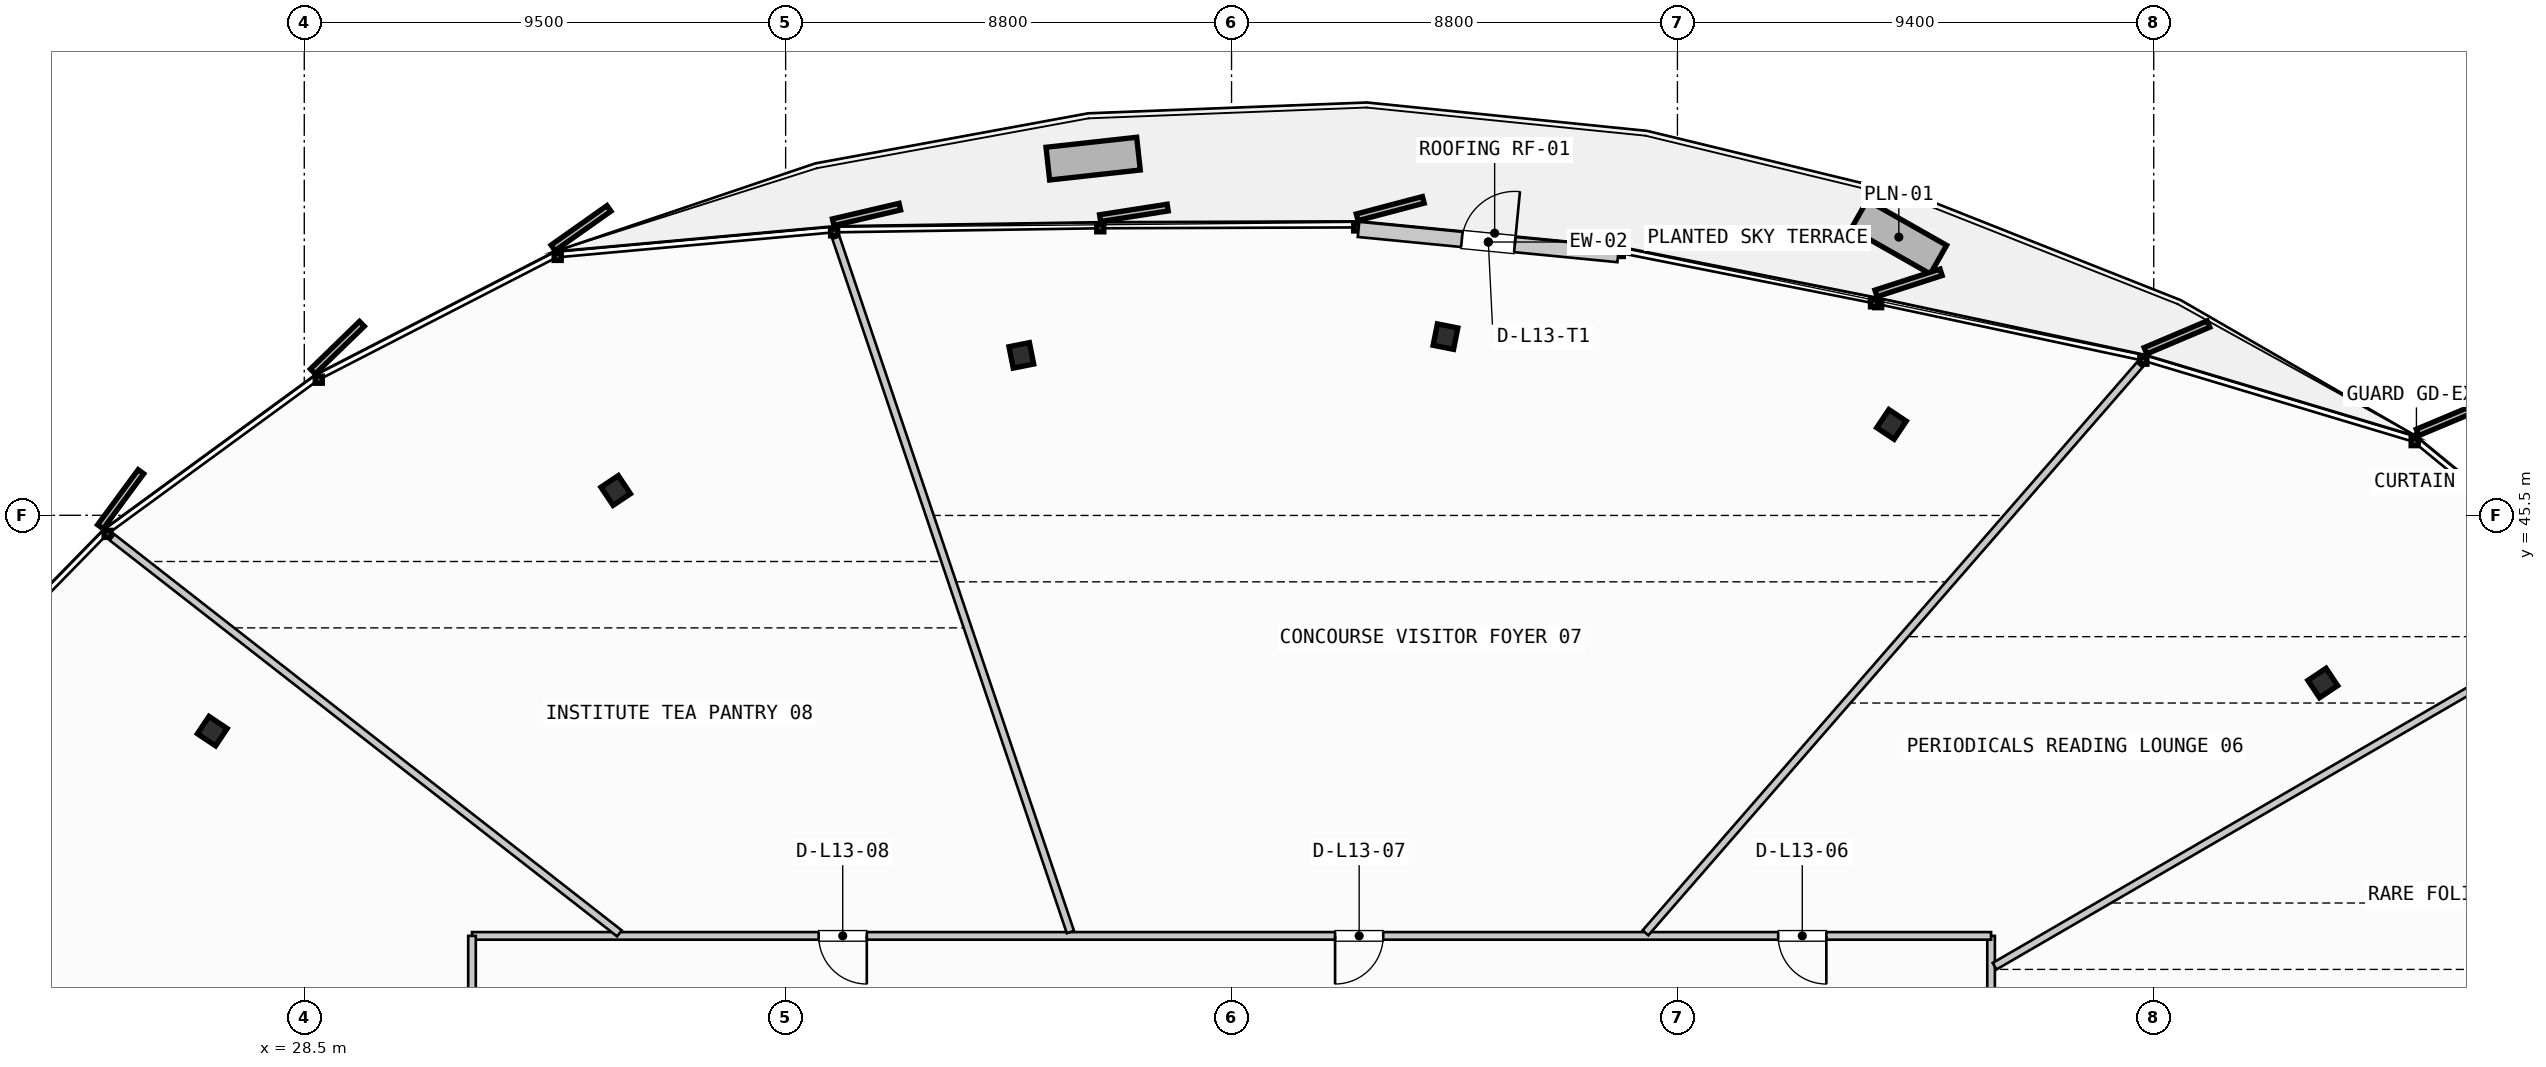
"""IFC4 building model, lengths in metres.
Left out: names, types, materials, properties, quantities, classifications, styles, units other than length and angle.
Written with IfcOpenShell. Run it as: python <this file> out.ifc"""

import sys

from ifc_helpers import new_model, si_unit, direction, frame, frame_2d, origin, origin_2d, place, context, subcontext, project, spatial, rectangle, i_section, extrude, source, transform, mapped, element, fill, save


model = new_model("IFC4")
c1 = context("Model", 3, precision=1e-05, world=origin(), true_north=direction((0.0, 1.0)))
c2 = subcontext(c1, "Body", "Model", "MODEL_VIEW")
j1 = project(units=[si_unit("LENGTHUNIT", "METRE"), si_unit("PLANEANGLEUNIT", "RADIAN")], contexts=[c1])
p1 = place(None, origin())
s1 = spatial("IfcSite", under=j1, at=p1, CompositionType="ELEMENT")
p2 = place(p1, origin())
s2 = spatial("IfcBuilding", under=s1, at=p2, CompositionType="ELEMENT")
p3 = place(p2, frame((0.0, 0.0, 56.2)))
s3 = spatial("IfcBuildingStorey", under=s2, at=p3, CompositionType="ELEMENT", Elevation=56.2)
m1 = source(origin(), c2, "Body", "SweptSolid", [
    extrude(i_section(OverallWidth=0.412, OverallDepth=0.431, WebThickness=0.042, FlangeThickness=0.068, FilletRadius=0.015, at=origin_2d()), origin(), (0.0, 0.0, 1.0), 3.55),
])
for number, where, z_axis, x_axis in (
    (1, (68.336, 42.19, 0.0), (0.0, 0.0, 1.0), (0.831, 0.556, 0.0)),
    (2, (59.825, 47.293, 0.0), (0.0, 0.0, 1.0), (0.556, 0.831, 0.0)),
    (3, (51.022, 49.026, 0.0), (0.0, 0.0, 1.0), (0.195, 0.981, 0.0)),
    (4, (42.652, 48.656, 0.0), (0.0, 0.0, 1.0), (-0.195, 0.981, 0.0)),
    (5, (34.646, 45.99, 0.0), (0.0, 0.0, 1.0), (-0.556, 0.831, 0.0)),
    (6, (26.685, 41.241, 0.0), (0.0, 0.0, 1.0), (-0.831, 0.556, 0.0)),
):
    element("IfcColumn", number, at=place(p3, frame(where, z_axis=z_axis, x_axis=x_axis)), inside=s3, PredefinedType="COLUMN", context=c2, shape_type="MappedRepresentation", body=[
        mapped(m1, transform((0.0, 0.0, 0.0), scale=1.0)),
    ])
p4 = place(p3, frame((49.306, 51.142, 0.0), z_axis=(0.0, 0.0, 1.0), x_axis=(0.995308557382, -0.096751618082, 0.0)))
e7 = element("IfcWall", 7, at=p4, inside=s3, PredefinedType="SOLIDWALL", context=c2, shape_type="SweptSolid", body=[
    extrude(rectangle(XDim=5.148, YDim=0.3, at=frame_2d((2.574, 0.0))), origin(), (0.0, 0.0, 1.0), 2.925),
])
p5 = place(p4, frame((2.049, 0.0, 0.0)))
e8 = element("IfcOpeningElement", 8, at=p5, cuts=e7, PredefinedType="OPENING", context=c2, shape_type="SweptSolid", body=[
    extrude(rectangle(XDim=1.05, YDim=2.2, at=frame_2d((0.525, 1.1))), frame((0.0, 0.16, 0.0), z_axis=(0.0, -1.0, 0.0), x_axis=(1.0, 0.0, 0.0)), (0.0, 0.0, 1.0), 0.32),
])
p6 = place(p3, frame((61.79, 17.98, 0.0), z_axis=(0.0, 0.0, 1.0), x_axis=(0.0, 1.0, 0.0)))
e9 = element("IfcWall", 9, at=p6, inside=s3, PredefinedType="PARTITIONING", context=c2, shape_type="SweptSolid", body=[
    extrude(rectangle(XDim=19.22, YDim=0.15, at=frame_2d((9.61, 0.0))), origin(), (0.0, 0.0, 1.0), 2.645),
])
p7 = place(p6, frame((2.332, 0.0, 0.0)))
e10 = element("IfcOpeningElement", 10, at=p7, cuts=e9, PredefinedType="OPENING", context=c2, shape_type="SweptSolid", body=[
    extrude(rectangle(XDim=0.95, YDim=2.15, at=frame_2d((0.475, 1.075))), frame((0.0, 0.085, 0.0), z_axis=(0.0, -1.0, 0.0), x_axis=(1.0, 0.0, 0.0)), (0.0, 0.0, 1.0), 0.17),
])
p8 = place(p6, frame((8.811, 0.0, 0.0)))
e11 = element("IfcOpeningElement", 11, at=p8, cuts=e9, PredefinedType="OPENING", context=c2, shape_type="SweptSolid", body=[
    extrude(rectangle(XDim=0.95, YDim=2.15, at=frame_2d((0.475, 1.075))), frame((0.0, 0.085, 0.0), z_axis=(0.0, -1.0, 0.0), x_axis=(1.0, 0.0, 0.0)), (0.0, 0.0, 1.0), 0.17),
])
p9 = place(p6, frame((15.61, 0.0, 0.0)))
e12 = element("IfcOpeningElement", 12, at=p9, cuts=e9, PredefinedType="OPENING", context=c2, shape_type="SweptSolid", body=[
    extrude(rectangle(XDim=0.95, YDim=2.15, at=frame_2d((0.475, 1.075))), frame((0.0, 0.085, 0.0), z_axis=(0.0, -1.0, 0.0), x_axis=(1.0, 0.0, 0.0)), (0.0, 0.0, 1.0), 0.17),
])
p10 = place(p3, frame((61.79, 37.2, 0.0), z_axis=(0.0, 0.0, 1.0), x_axis=(-1.0, 0.0, 0.0)))
e13 = element("IfcWall", 13, at=p10, inside=s3, PredefinedType="PARTITIONING", context=c2, shape_type="SweptSolid", body=[
    extrude(rectangle(XDim=29.98, YDim=0.15, at=frame_2d((14.99, 0.0))), origin(), (0.0, 0.0, 1.0), 2.645),
])
p11 = place(p10, frame((3.251, 0.0, 0.0)))
e14 = element("IfcOpeningElement", 14, at=p11, cuts=e13, PredefinedType="OPENING", context=c2, shape_type="SweptSolid", body=[
    extrude(rectangle(XDim=0.95, YDim=2.15, at=frame_2d((0.475, 1.075))), frame((0.0, 0.085, 0.0), z_axis=(0.0, -1.0, 0.0), x_axis=(1.0, 0.0, 0.0)), (0.0, 0.0, 1.0), 0.17),
])
p12 = place(p10, frame((11.996, 0.0, 0.0)))
e15 = element("IfcOpeningElement", 15, at=p12, cuts=e13, PredefinedType="OPENING", context=c2, shape_type="SweptSolid", body=[
    extrude(rectangle(XDim=0.95, YDim=2.15, at=frame_2d((0.475, 1.075))), frame((0.0, 0.085, 0.0), z_axis=(0.0, -1.0, 0.0), x_axis=(1.0, 0.0, 0.0)), (0.0, 0.0, 1.0), 0.17),
])
p13 = place(p10, frame((22.188, 0.0, 0.0)))
e16 = element("IfcOpeningElement", 16, at=p13, cuts=e13, PredefinedType="OPENING", context=c2, shape_type="SweptSolid", body=[
    extrude(rectangle(XDim=0.95, YDim=2.15, at=frame_2d((0.475, 1.075))), frame((0.0, 0.085, 0.0), z_axis=(0.0, -1.0, 0.0), x_axis=(1.0, 0.0, 0.0)), (0.0, 0.0, 1.0), 0.17),
])
p14 = place(p3, frame((31.81, 37.2, 0.0), z_axis=(0.0, 0.0, 1.0), x_axis=(0.0, -1.0, 0.0)))
e17 = element("IfcWall", 17, at=p14, inside=s3, PredefinedType="PARTITIONING", context=c2, shape_type="SweptSolid", body=[
    extrude(rectangle(XDim=19.22, YDim=0.15, at=frame_2d((9.61, 0.0))), origin(), (0.0, 0.0, 1.0), 2.645),
])
p15 = place(p14, frame((4.263, 0.0, 0.0)))
e18 = element("IfcOpeningElement", 18, at=p15, cuts=e17, PredefinedType="OPENING", context=c2, shape_type="SweptSolid", body=[
    extrude(rectangle(XDim=0.95, YDim=2.15, at=frame_2d((0.475, 1.075))), frame((0.0, 0.085, 0.0), z_axis=(0.0, -1.0, 0.0), x_axis=(1.0, 0.0, 0.0)), (0.0, 0.0, 1.0), 0.17),
])
p16 = place(p14, frame((13.293, 0.0, 0.0)))
e19 = element("IfcOpeningElement", 19, at=p16, cuts=e17, PredefinedType="OPENING", context=c2, shape_type="SweptSolid", body=[
    extrude(rectangle(XDim=0.95, YDim=2.15, at=frame_2d((0.475, 1.075))), frame((0.0, 0.085, 0.0), z_axis=(0.0, -1.0, 0.0), x_axis=(1.0, 0.0, 0.0)), (0.0, 0.0, 1.0), 0.17),
])
p17 = place(p3, frame((61.859, 36.602, 0.0), z_axis=(0.0, 0.0, 1.0), x_axis=(0.864825995499, 0.502071705544, 0.0)))
e20 = element("IfcWall", 20, at=p17, inside=s3, PredefinedType="PARTITIONING", context=c2, shape_type="SweptSolid", body=[
    extrude(rectangle(XDim=14.03, YDim=0.15, at=frame_2d((7.015, 0.0))), origin(), (0.0, 0.0, 1.0), 2.645),
])
p18 = place(p3, frame((54.969, 37.26, 0.0), z_axis=(0.0, 0.0, 1.0), x_axis=(0.656478076952, 0.754345103041, 0.0)))
e21 = element("IfcWall", 21, at=p18, inside=s3, PredefinedType="PARTITIONING", context=c2, shape_type="SweptSolid", body=[
    extrude(rectangle(XDim=14.858, YDim=0.15, at=frame_2d((7.429, 0.0))), origin(), (0.0, 0.0, 1.0), 2.645),
])
p19 = place(p3, frame((43.62, 37.276, 0.0), z_axis=(0.0, 0.0, 1.0), x_axis=(-0.319942102515, 0.947437096085, 0.0)))
e22 = element("IfcWall", 22, at=p19, inside=s3, PredefinedType="PARTITIONING", context=c2, shape_type="SweptSolid", body=[
    extrude(rectangle(XDim=14.464, YDim=0.15, at=frame_2d((7.232, 0.0))), origin(), (0.0, 0.0, 1.0), 2.645),
])
p20 = place(p3, frame((34.719, 37.249, 0.0), z_axis=(0.0, 0.0, 1.0), x_axis=(-0.78829236469, 0.615300859556, 0.0)))
e23 = element("IfcWall", 23, at=p20, inside=s3, PredefinedType="PARTITIONING", context=c2, shape_type="SweptSolid", body=[
    extrude(rectangle(XDim=12.703, YDim=0.15, at=frame_2d((6.352, 0.0))), origin(), (0.0, 0.0, 1.0), 2.645),
])
m2 = source(origin(), c2, "Body", "SweptSolid", [
    extrude(rectangle(XDim=1.05, YDim=2.2, at=frame_2d((0.525, 1.1))), frame((0.0, 0.025, 0.0), z_axis=(0.0, -1.0, 0.0), x_axis=(1.0, 0.0, 0.0)), (0.0, 0.0, 1.0), 0.05),
])
p21 = place(p5, origin())
e24 = element("IfcDoor", 24, at=p21, inside=s3, OperationType="SINGLE_SWING_RIGHT", PredefinedType="DOOR", context=c2, shape_type="MappedRepresentation", body=[
    mapped(m2, transform((0.0, 0.0, 0.0), scale=1.0)),
])
fill(e8, e24)
m3 = source(origin(), c2, "Body", "SweptSolid", [
    extrude(rectangle(XDim=0.95, YDim=2.15, at=frame_2d((0.475, 1.075))), frame((0.0, 0.025, 0.0), z_axis=(0.0, -1.0, 0.0), x_axis=(1.0, 0.0, 0.0)), (0.0, 0.0, 1.0), 0.05),
])
p22 = place(p11, origin())
e25 = element("IfcDoor", 25, at=p22, inside=s3, OperationType="SINGLE_SWING_LEFT", PredefinedType="DOOR", context=c2, shape_type="MappedRepresentation", body=[
    mapped(m3, transform((0.0, 0.0, 0.0), scale=1.0)),
])
fill(e14, e25)
p23 = place(p12, origin())
e26 = element("IfcDoor", 26, at=p23, inside=s3, OperationType="SINGLE_SWING_RIGHT", PredefinedType="DOOR", context=c2, shape_type="MappedRepresentation", body=[
    mapped(m3, transform((0.0, 0.0, 0.0), scale=1.0)),
])
fill(e15, e26)
p24 = place(p13, origin())
e27 = element("IfcDoor", 27, at=p24, inside=s3, OperationType="SINGLE_SWING_LEFT", PredefinedType="DOOR", context=c2, shape_type="MappedRepresentation", body=[
    mapped(m3, transform((0.0, 0.0, 0.0), scale=1.0)),
])
fill(e16, e27)
save(model, sys.argv[1])
